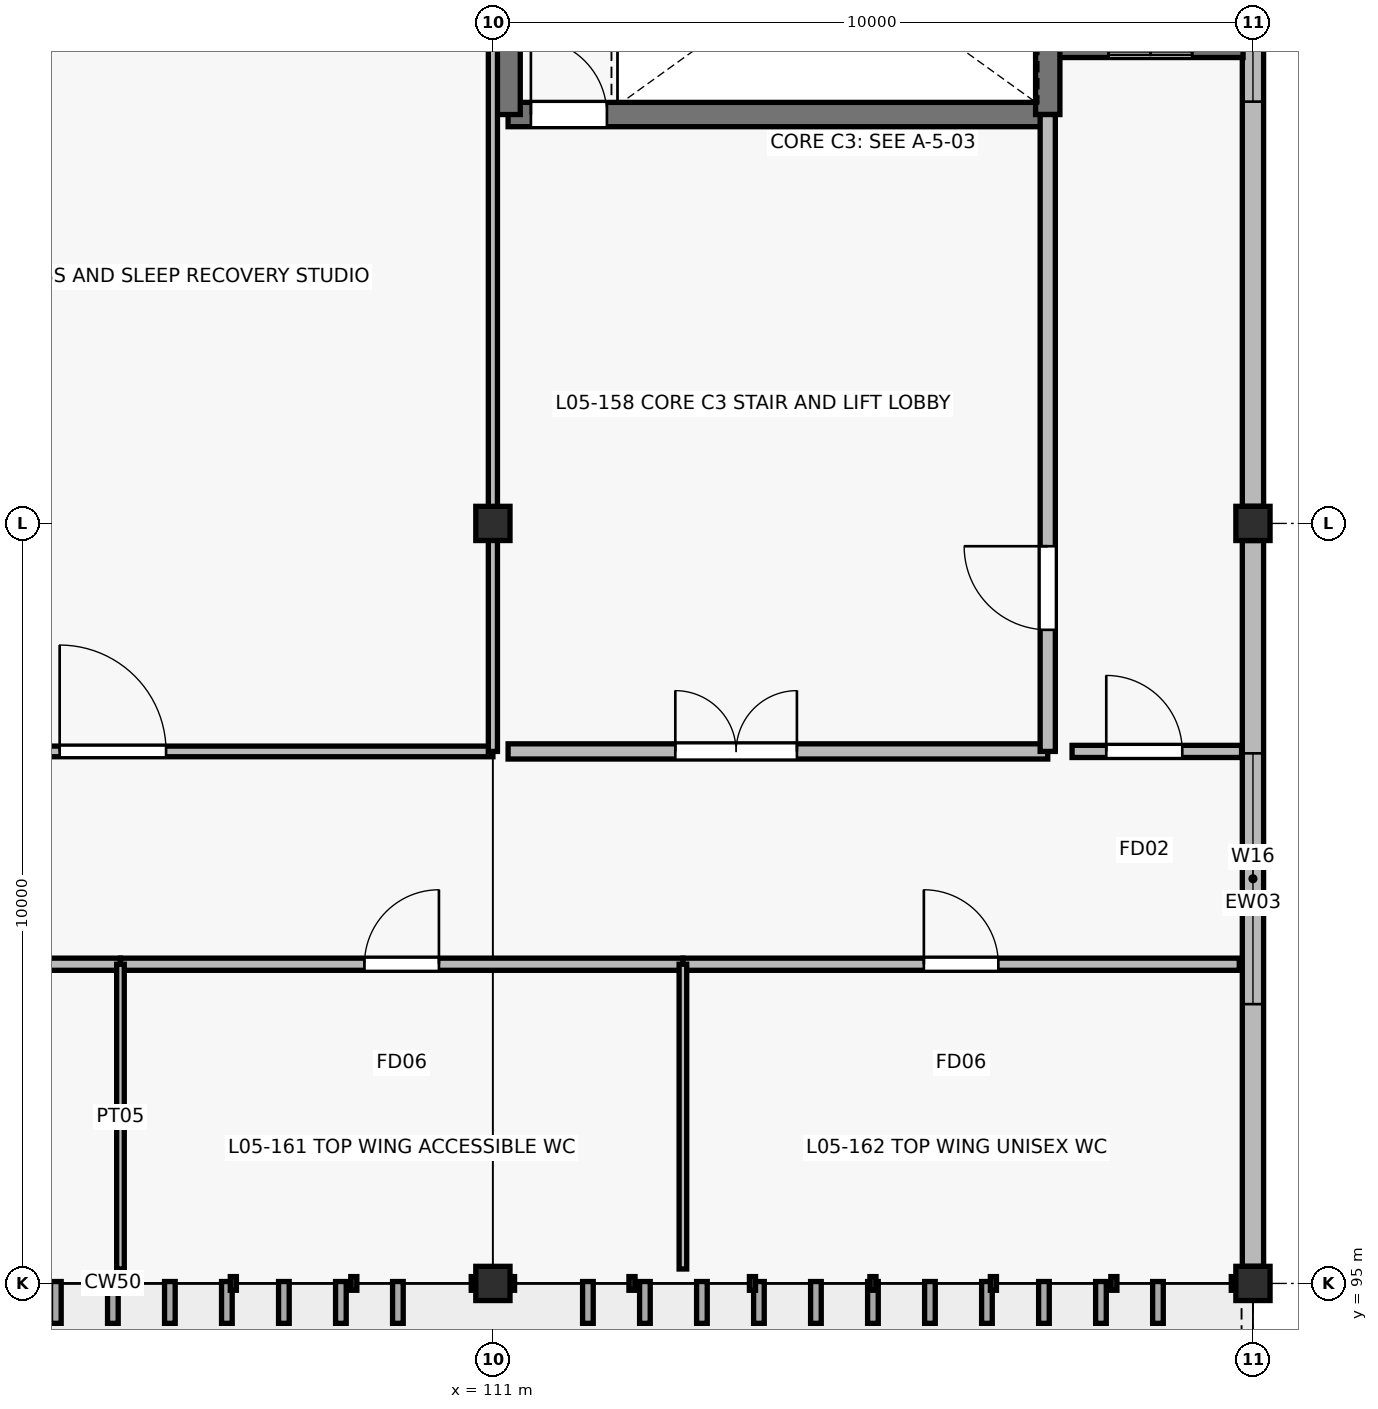
"""IFC4 building model, lengths in metres.
Left out: names, types, materials, properties, quantities, classifications, styles, units other than length and angle.
Written with IfcOpenShell. Run it as: python <this file> out.ifc"""

import sys

from ifc_helpers import new_model, si_unit, direction, frame, frame_2d, origin, origin_2d, place, context, subcontext, project, spatial, rectangle, extrude, element, fill, save


model = new_model("IFC4")
c1 = context("Model", 3, precision=1e-05, world=origin(), true_north=direction((0.0, 1.0)))
c2 = subcontext(c1, "Body", "Model", "MODEL_VIEW")
j1 = project(units=[si_unit("LENGTHUNIT", "METRE"), si_unit("PLANEANGLEUNIT", "RADIAN")], contexts=[c1])
p1 = place(None, origin())
s1 = spatial("IfcSite", under=j1, at=p1, CompositionType="ELEMENT")
p2 = place(p1, origin())
s2 = spatial("IfcBuilding", under=s1, at=p2, CompositionType="ELEMENT")
p3 = place(p2, frame((0.0, 0.0, 21.6)))
s3 = spatial("IfcBuildingStorey", under=s2, at=p3, CompositionType="ELEMENT", Elevation=21.6)
for number, where, z_axis, x_axis in (
    (1, (111.0, 95.0, 0.0), (0.0, 0.0, 1.0), (1.0, 0.0, 0.0)),
    (2, (111.0, 105.0, 0.0), (0.0, 0.0, 1.0), (1.0, 0.0, 0.0)),
    (3, (121.0, 95.0, 0.0), (0.0, 0.0, 1.0), (1.0, 0.0, 0.0)),
    (4, (121.0, 105.0, 0.0), (0.0, 0.0, 1.0), (1.0, 0.0, 0.0)),
):
    element("IfcColumn", number, at=place(p3, frame(where, z_axis=z_axis, x_axis=x_axis)), inside=s3, PredefinedType="COLUMN", context=c2, shape_type="SweptSolid", body=[
        extrude(rectangle(XDim=0.45, YDim=0.45, at=origin_2d()), origin(), (0.0, 0.0, 1.0), 4.2),
    ])
p4 = place(p3, frame((121.0, 104.775, 0.0), z_axis=(0.0, 0.0, 1.0), x_axis=(0.0, -1.0, 0.0)))
e5 = element("IfcWall", 5, at=p4, inside=s3, PredefinedType="SOLIDWALL", context=c2, shape_type="SweptSolid", body=[
    extrude(rectangle(XDim=9.55, YDim=0.28, at=frame_2d((4.775, 0.0))), origin(), (0.0, 0.0, 1.0), 3.25),
])
p5 = place(p4, frame((2.8, 0.0, 0.9)))
e6 = element("IfcOpeningElement", 6, at=p5, cuts=e5, PredefinedType="OPENING", context=c2, shape_type="SweptSolid", body=[
    extrude(rectangle(XDim=3.3, YDim=1.8, at=frame_2d((1.65, 0.9))), frame((0.0, 0.15, 0.0), z_axis=(0.0, -1.0, 0.0), x_axis=(1.0, 0.0, 0.0)), (0.0, 0.0, 1.0), 0.3),
])
p6 = place(p3, frame((121.0, 114.85, 0.0), z_axis=(0.0, 0.0, 1.0), x_axis=(0.0, -1.0, 0.0)))
e7 = element("IfcWall", 7, at=p6, inside=s3, PredefinedType="SOLIDWALL", context=c2, shape_type="SweptSolid", body=[
    extrude(rectangle(XDim=9.625, YDim=0.28, at=frame_2d((4.812, 0.0))), origin(), (0.0, 0.0, 1.0), 3.25),
])
p7 = place(p6, frame((2.8, 0.0, 0.9)))
e8 = element("IfcOpeningElement", 8, at=p7, cuts=e7, PredefinedType="OPENING", context=c2, shape_type="SweptSolid", body=[
    extrude(rectangle(XDim=1.5, YDim=2.1, at=frame_2d((0.75, 1.05))), frame((0.0, 0.15, 0.0), z_axis=(0.0, -1.0, 0.0), x_axis=(1.0, 0.0, 0.0)), (0.0, 0.0, 1.0), 0.3),
])
p8 = place(p3, frame((120.87, 111.25, 0.0), z_axis=(0.0, 0.0, 1.0), x_axis=(-1.0, 0.0, 0.0)))
e9 = element("IfcWall", 9, at=p8, inside=s3, PredefinedType="SHEAR", context=c2, shape_type="SweptSolid", body=[
    extrude(rectangle(XDim=2.44, YDim=0.24, at=frame_2d((1.22, 0.0))), origin(), (0.0, 0.0, 1.0), 3.95),
])
p9 = place(p8, frame((0.67, 0.0, 0.0)))
e10 = element("IfcOpeningElement", 10, at=p9, cuts=e9, PredefinedType="OPENING", context=c2, shape_type="SweptSolid", body=[
    extrude(rectangle(XDim=1.1, YDim=2.15, at=frame_2d((0.55, 1.075))), frame((0.0, 0.13, 0.0), z_axis=(0.0, -1.0, 0.0), x_axis=(1.0, 0.0, 0.0)), (0.0, 0.0, 1.0), 0.26),
])
p10 = place(p3, frame((111.2, 110.38, 0.0), z_axis=(0.0, 0.0, 1.0), x_axis=(1.0, 0.0, 0.0)))
e11 = element("IfcWall", 11, at=p10, inside=s3, PredefinedType="SHEAR", context=c2, shape_type="SweptSolid", body=[
    extrude(rectangle(XDim=7.1, YDim=0.32, at=frame_2d((3.55, 0.0))), origin(), (0.0, 0.0, 1.0), 3.95),
])
p11 = place(p10, frame((0.3, 0.0, 0.0)))
e12 = element("IfcOpeningElement", 12, at=p11, cuts=e11, PredefinedType="OPENING", context=c2, shape_type="SweptSolid", body=[
    extrude(rectangle(XDim=1.0, YDim=2.15, at=frame_2d((0.5, 1.075))), frame((0.0, 0.17, 0.0), z_axis=(0.0, -1.0, 0.0), x_axis=(1.0, 0.0, 0.0)), (0.0, 0.0, 1.0), 0.34),
])
for number, where, z_axis, x_axis in (
    (13, (118.3, 110.38, 0.0), (0.0, 0.0, 1.0), (0.0, 1.0, 0.0)),
    (14, (111.2, 114.62, 0.0), (0.0, 0.0, 1.0), (0.0, -1.0, 0.0)),
):
    element("IfcWall", number, at=place(p3, frame(where, z_axis=z_axis, x_axis=x_axis)), inside=s3, PredefinedType="SHEAR", context=c2, shape_type="SweptSolid", body=[
        extrude(rectangle(XDim=4.24, YDim=0.32, at=frame_2d((2.12, 0.0))), origin(), (0.0, 0.0, 1.0), 3.95),
    ])
p12 = place(p3, frame((111.2, 102.0, 0.0), z_axis=(0.0, 0.0, 1.0), x_axis=(1.0, 0.0, 0.0)))
e15 = element("IfcWall", 15, at=p12, inside=s3, PredefinedType="PARTITIONING", context=c2, shape_type="SweptSolid", body=[
    extrude(rectangle(XDim=7.1, YDim=0.2, at=frame_2d((3.55, 0.0))), origin(), (0.0, 0.0, 1.0), 3.25),
])
p13 = place(p12, frame((2.2, 0.0, 0.0)))
e16 = element("IfcOpeningElement", 16, at=p13, cuts=e15, PredefinedType="OPENING", context=c2, shape_type="SweptSolid", body=[
    extrude(rectangle(XDim=1.6, YDim=2.2, at=frame_2d((0.8, 1.1))), frame((0.0, 0.11, 0.0), z_axis=(0.0, -1.0, 0.0), x_axis=(1.0, 0.0, 0.0)), (0.0, 0.0, 1.0), 0.22),
])
p14 = place(p3, frame((118.3, 102.0, 0.0), z_axis=(0.0, 0.0, 1.0), x_axis=(0.0, 1.0, 0.0)))
e17 = element("IfcWall", 17, at=p14, inside=s3, PredefinedType="PARTITIONING", context=c2, shape_type="SweptSolid", body=[
    extrude(rectangle(XDim=8.38, YDim=0.2, at=frame_2d((4.19, 0.0))), origin(), (0.0, 0.0, 1.0), 3.3),
])
p15 = place(p14, frame((1.6, 0.0, 0.0)))
e18 = element("IfcOpeningElement", 18, at=p15, cuts=e17, PredefinedType="OPENING", context=c2, shape_type="SweptSolid", body=[
    extrude(rectangle(XDim=1.1, YDim=2.15, at=frame_2d((0.55, 1.075))), frame((0.0, 0.11, 0.0), z_axis=(0.0, -1.0, 0.0), x_axis=(1.0, 0.0, 0.0)), (0.0, 0.0, 1.0), 0.22),
])
p16 = place(p3, frame((118.62, 102.0, 0.0), z_axis=(0.0, 0.0, 1.0), x_axis=(1.0, 0.0, 0.0)))
e19 = element("IfcWall", 19, at=p16, inside=s3, PredefinedType="PARTITIONING", context=c2, shape_type="SweptSolid", body=[
    extrude(rectangle(XDim=2.23, YDim=0.16, at=frame_2d((1.115, 0.0))), origin(), (0.0, 0.0, 1.0), 3.25),
])
p17 = place(p16, frame((0.45, 0.0, 0.0)))
e20 = element("IfcOpeningElement", 20, at=p17, cuts=e19, PredefinedType="OPENING", context=c2, shape_type="SweptSolid", body=[
    extrude(rectangle(XDim=1.0, YDim=2.15, at=frame_2d((0.5, 1.075))), frame((0.0, 0.09, 0.0), z_axis=(0.0, -1.0, 0.0), x_axis=(1.0, 0.0, 0.0)), (0.0, 0.0, 1.0), 0.18),
])
p18 = place(p3, frame((86.1, 99.2, 0.0), z_axis=(0.0, 0.0, 1.0), x_axis=(1.0, 0.0, 0.0)))
e21 = element("IfcWall", 21, at=p18, inside=s3, PredefinedType="PARTITIONING", context=c2, shape_type="SweptSolid", body=[
    extrude(rectangle(XDim=20.0, YDim=0.16, at=frame_2d((10.0, 0.0))), origin(), (0.0, 0.0, 1.0), 3.25),
])
p19 = place(p18, frame((9.475, 0.0, 0.0)))
e22 = element("IfcOpeningElement", 22, at=p19, cuts=e21, PredefinedType="OPENING", context=c2, shape_type="SweptSolid", body=[
    extrude(rectangle(XDim=1.05, YDim=2.1, at=frame_2d((0.525, 1.05))), frame((0.0, 0.09, 0.0), z_axis=(0.0, -1.0, 0.0), x_axis=(1.0, 0.0, 0.0)), (0.0, 0.0, 1.0), 0.18),
])
p20 = place(p3, frame((106.1, 99.2, 0.0), z_axis=(0.0, 0.0, 1.0), x_axis=(1.0, 0.0, 0.0)))
e23 = element("IfcWall", 23, at=p20, inside=s3, PredefinedType="PARTITIONING", context=c2, shape_type="SweptSolid", body=[
    extrude(rectangle(XDim=7.4, YDim=0.16, at=frame_2d((3.7, 0.0))), origin(), (0.0, 0.0, 1.0), 3.25),
])
p21 = place(p20, frame((3.21, 0.0, 0.0)))
e24 = element("IfcOpeningElement", 24, at=p21, cuts=e23, PredefinedType="OPENING", context=c2, shape_type="SweptSolid", body=[
    extrude(rectangle(XDim=0.98, YDim=2.1, at=frame_2d((0.49, 1.05))), frame((0.0, 0.09, 0.0), z_axis=(0.0, -1.0, 0.0), x_axis=(1.0, 0.0, 0.0)), (0.0, 0.0, 1.0), 0.18),
])
p22 = place(p3, frame((106.1, 95.19, 0.0), z_axis=(0.0, 0.0, 1.0), x_axis=(0.0, 1.0, 0.0)))
e25 = element("IfcWall", 25, at=p22, inside=s3, PredefinedType="PARTITIONING", context=c2, shape_type="SweptSolid", body=[
    extrude(rectangle(XDim=4.01, YDim=0.1, at=frame_2d((2.005, 0.0))), origin(), (0.0, 0.0, 1.0), 3.3),
])
p23 = place(p3, frame((113.5, 99.2, 0.0), z_axis=(0.0, 0.0, 1.0), x_axis=(1.0, 0.0, 0.0)))
e26 = element("IfcWall", 26, at=p23, inside=s3, PredefinedType="PARTITIONING", context=c2, shape_type="SweptSolid", body=[
    extrude(rectangle(XDim=7.32, YDim=0.16, at=frame_2d((3.66, 0.0))), origin(), (0.0, 0.0, 1.0), 3.25),
])
p24 = place(p23, frame((3.17, 0.0, 0.0)))
e27 = element("IfcOpeningElement", 27, at=p24, cuts=e26, PredefinedType="OPENING", context=c2, shape_type="SweptSolid", body=[
    extrude(rectangle(XDim=0.98, YDim=2.1, at=frame_2d((0.49, 1.05))), frame((0.0, 0.09, 0.0), z_axis=(0.0, -1.0, 0.0), x_axis=(1.0, 0.0, 0.0)), (0.0, 0.0, 1.0), 0.18),
])
p25 = place(p3, frame((113.5, 95.19, 0.0), z_axis=(0.0, 0.0, 1.0), x_axis=(0.0, 1.0, 0.0)))
e28 = element("IfcWall", 28, at=p25, inside=s3, PredefinedType="PARTITIONING", context=c2, shape_type="SweptSolid", body=[
    extrude(rectangle(XDim=4.01, YDim=0.1, at=frame_2d((2.005, 0.0))), origin(), (0.0, 0.0, 1.0), 3.3),
])
p26 = place(p3, frame((101.0, 102.0, 0.0), z_axis=(0.0, 0.0, 1.0), x_axis=(1.0, 0.0, 0.0)))
e29 = element("IfcWall", 29, at=p26, inside=s3, PredefinedType="PARTITIONING", context=c2, shape_type="SweptSolid", body=[
    extrude(rectangle(XDim=10.0, YDim=0.14, at=frame_2d((5.0, 0.0))), origin(), (0.0, 0.0, 1.0), 3.25),
])
p27 = place(p26, frame((4.3, 0.0, 0.0)))
e30 = element("IfcOpeningElement", 30, at=p27, cuts=e29, PredefinedType="OPENING", context=c2, shape_type="SweptSolid", body=[
    extrude(rectangle(XDim=1.4, YDim=2.2, at=frame_2d((0.7, 1.1))), frame((0.0, 0.08, 0.0), z_axis=(0.0, -1.0, 0.0), x_axis=(1.0, 0.0, 0.0)), (0.0, 0.0, 1.0), 0.16),
])
p28 = place(p3, frame((111.0, 102.0, 0.0), z_axis=(0.0, 0.0, 1.0), x_axis=(0.0, 1.0, 0.0)))
e31 = element("IfcWall", 31, at=p28, inside=s3, PredefinedType="PARTITIONING", context=c2, shape_type="SweptSolid", body=[
    extrude(rectangle(XDim=12.75, YDim=0.12, at=frame_2d((6.375, 0.0))), origin(), (0.0, 0.0, 1.0), 3.25),
])
p29 = place(p5, origin())
e32 = element("IfcWindow", 32, at=p29, inside=s3, PartitioningType="DOUBLE_PANEL_VERTICAL", PredefinedType="WINDOW", context=c2, shape_type="SweptSolid", body=[
    extrude(rectangle(XDim=3.3, YDim=1.8, at=frame_2d((1.65, 0.9))), frame((0.0, 0.03, 0.0), z_axis=(0.0, -1.0, 0.0), x_axis=(1.0, 0.0, 0.0)), (0.0, 0.0, 1.0), 0.06),
])
fill(e6, e32)
p30 = place(p7, origin())
e33 = element("IfcWindow", 33, at=p30, inside=s3, PartitioningType="SINGLE_PANEL", PredefinedType="WINDOW", context=c2, shape_type="SweptSolid", body=[
    extrude(rectangle(XDim=1.5, YDim=2.1, at=frame_2d((0.75, 1.05))), frame((0.0, 0.03, 0.0), z_axis=(0.0, -1.0, 0.0), x_axis=(1.0, 0.0, 0.0)), (0.0, 0.0, 1.0), 0.06),
])
fill(e8, e33)
p31 = place(p11, origin())
e34 = element("IfcDoor", 34, at=p31, inside=s3, OperationType="SINGLE_SWING_LEFT", PredefinedType="DOOR", context=c2, shape_type="SweptSolid", body=[
    extrude(rectangle(XDim=1.0, YDim=2.15, at=frame_2d((0.5, 1.075))), frame((0.0, 0.025, 0.0), z_axis=(0.0, -1.0, 0.0), x_axis=(1.0, 0.0, 0.0)), (0.0, 0.0, 1.0), 0.05),
])
fill(e12, e34)
p32 = place(p13, origin())
e35 = element("IfcDoor", 35, at=p32, inside=s3, OperationType="DOUBLE_DOOR_SINGLE_SWING", PredefinedType="DOOR", context=c2, shape_type="SweptSolid", body=[
    extrude(rectangle(XDim=1.6, YDim=2.2, at=frame_2d((0.8, 1.1))), frame((0.0, 0.025, 0.0), z_axis=(0.0, -1.0, 0.0), x_axis=(1.0, 0.0, 0.0)), (0.0, 0.0, 1.0), 0.05),
])
fill(e16, e35)
p33 = place(p15, origin())
e36 = element("IfcDoor", 36, at=p33, inside=s3, OperationType="SINGLE_SWING_RIGHT", PredefinedType="DOOR", context=c2, shape_type="SweptSolid", body=[
    extrude(rectangle(XDim=1.1, YDim=2.15, at=frame_2d((0.55, 1.075))), frame((0.0, 0.025, 0.0), z_axis=(0.0, -1.0, 0.0), x_axis=(1.0, 0.0, 0.0)), (0.0, 0.0, 1.0), 0.05),
])
fill(e18, e36)
p34 = place(p17, origin())
e37 = element("IfcDoor", 37, at=p34, inside=s3, OperationType="SINGLE_SWING_LEFT", PredefinedType="DOOR", context=c2, shape_type="SweptSolid", body=[
    extrude(rectangle(XDim=1.0, YDim=2.15, at=frame_2d((0.5, 1.075))), frame((0.0, 0.025, 0.0), z_axis=(0.0, -1.0, 0.0), x_axis=(1.0, 0.0, 0.0)), (0.0, 0.0, 1.0), 0.05),
])
fill(e20, e37)
p35 = place(p21, origin())
e38 = element("IfcDoor", 38, at=p35, inside=s3, OperationType="SINGLE_SWING_RIGHT", PredefinedType="DOOR", context=c2, shape_type="SweptSolid", body=[
    extrude(rectangle(XDim=0.98, YDim=2.1, at=frame_2d((0.49, 1.05))), frame((0.0, 0.025, 0.0), z_axis=(0.0, -1.0, 0.0), x_axis=(1.0, 0.0, 0.0)), (0.0, 0.0, 1.0), 0.05),
])
fill(e24, e38)
p36 = place(p24, origin())
e39 = element("IfcDoor", 39, at=p36, inside=s3, OperationType="SINGLE_SWING_LEFT", PredefinedType="DOOR", context=c2, shape_type="SweptSolid", body=[
    extrude(rectangle(XDim=0.98, YDim=2.1, at=frame_2d((0.49, 1.05))), frame((0.0, 0.025, 0.0), z_axis=(0.0, -1.0, 0.0), x_axis=(1.0, 0.0, 0.0)), (0.0, 0.0, 1.0), 0.05),
])
fill(e27, e39)
p37 = place(p27, origin())
e40 = element("IfcDoor", 40, at=p37, inside=s3, OperationType="SINGLE_SWING_LEFT", PredefinedType="DOOR", context=c2, shape_type="SweptSolid", body=[
    extrude(rectangle(XDim=1.4, YDim=2.2, at=frame_2d((0.7, 1.1))), frame((0.0, 0.025, 0.0), z_axis=(0.0, -1.0, 0.0), x_axis=(1.0, 0.0, 0.0)), (0.0, 0.0, 1.0), 0.05),
])
fill(e30, e40)
save(model, sys.argv[1])
